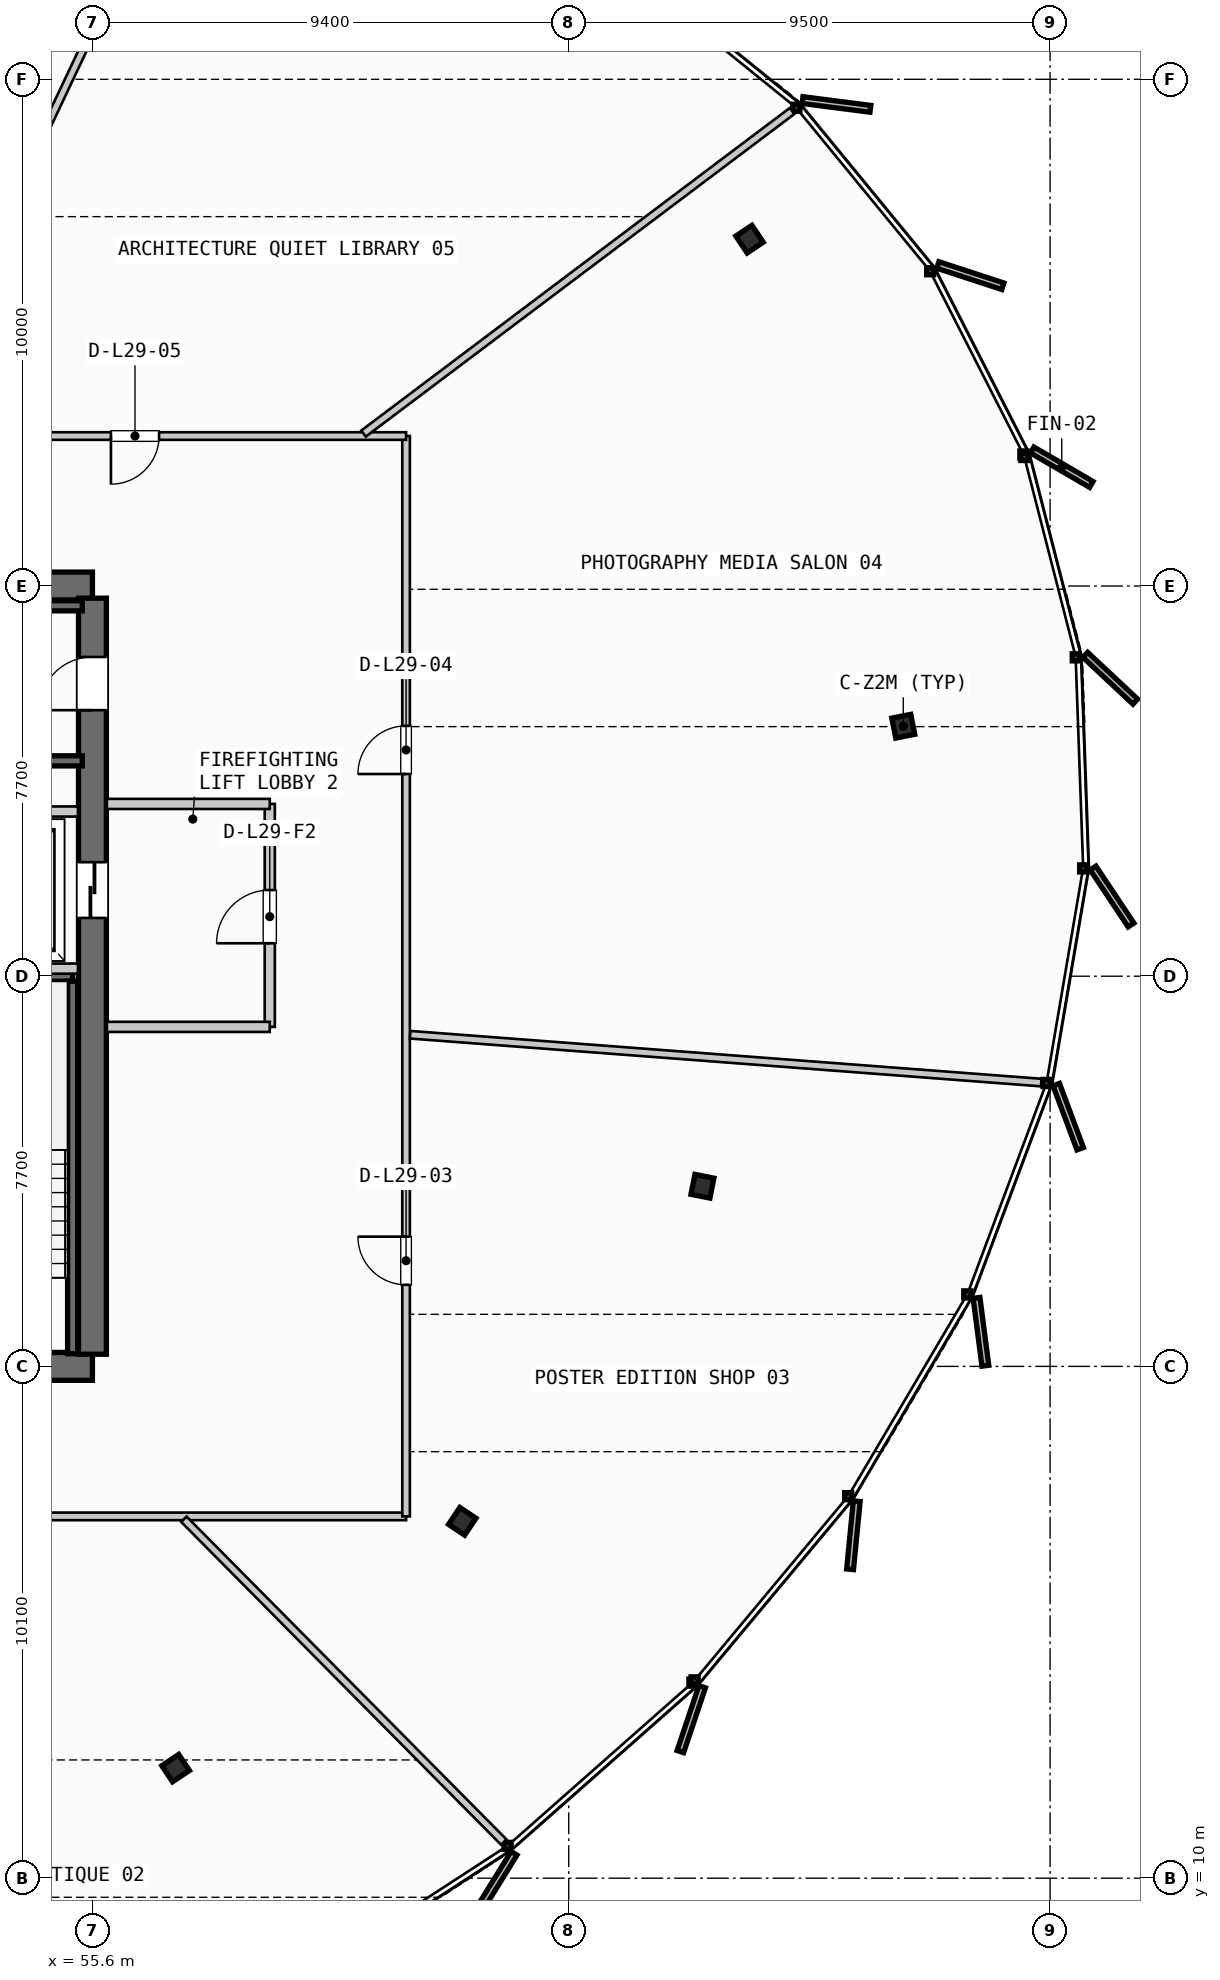
"""IFC4 building model, lengths in metres.
Left out: names, types, materials, properties, quantities, classifications, styles, units other than length and angle.
Written with IfcOpenShell. Run it as: python <this file> out.ifc"""

import sys

from ifc_helpers import new_model, si_unit, direction, frame, frame_2d, origin, origin_2d, place, context, subcontext, project, spatial, rectangle, i_section, extrude, source, transform, mapped, element, fill, save


model = new_model("IFC4")
c1 = context("Model", 3, precision=1e-05, world=origin(), true_north=direction((0.0, 1.0)))
c2 = subcontext(c1, "Body", "Model", "MODEL_VIEW")
j1 = project(units=[si_unit("LENGTHUNIT", "METRE"), si_unit("PLANEANGLEUNIT", "RADIAN")], contexts=[c1])
p1 = place(None, origin())
s1 = spatial("IfcSite", under=j1, at=p1, CompositionType="ELEMENT")
p2 = place(p1, origin())
s2 = spatial("IfcBuilding", under=s1, at=p2, CompositionType="ELEMENT")
p3 = place(p2, frame((0.0, 0.0, 118.0)))
s3 = spatial("IfcBuildingStorey", under=s2, at=p3, CompositionType="ELEMENT", Elevation=118.0)
p4 = place(p3, frame((38.0, 20.1, 0.0), z_axis=(0.0, 0.0, 1.0), x_axis=(1.0, 0.0, 0.0)))
e1 = element("IfcWall", 1, at=p4, inside=s3, PredefinedType="SHEAR", context=c2, shape_type="SweptSolid", body=[
    extrude(rectangle(XDim=17.6, YDim=0.55, at=frame_2d((8.8, 0.0))), origin(), (0.0, 0.0, 1.0), 3.35),
])
p5 = place(p4, frame((1.4, 0.0, 0.0)))
e2 = element("IfcOpeningElement", 2, at=p5, cuts=e1, PredefinedType="OPENING", context=c2, shape_type="SweptSolid", body=[
    extrude(rectangle(XDim=1.05, YDim=2.15, at=frame_2d((0.525, 1.075))), frame((0.0, 0.285, 0.0), z_axis=(0.0, -1.0, 0.0), x_axis=(1.0, 0.0, 0.0)), (0.0, 0.0, 1.0), 0.57),
])
p6 = place(p4, frame((15.15, 0.0, 0.0)))
e3 = element("IfcOpeningElement", 3, at=p6, cuts=e1, PredefinedType="OPENING", context=c2, shape_type="SweptSolid", body=[
    extrude(rectangle(XDim=1.05, YDim=2.15, at=frame_2d((0.525, 1.075))), frame((0.0, 0.285, 0.0), z_axis=(0.0, -1.0, 0.0), x_axis=(1.0, 0.0, 0.0)), (0.0, 0.0, 1.0), 0.57),
])
p7 = place(p3, frame((55.6, 35.5, 0.0), z_axis=(0.0, 0.0, 1.0), x_axis=(-1.0, 0.0, 0.0)))
e4 = element("IfcWall", 4, at=p7, inside=s3, PredefinedType="SHEAR", context=c2, shape_type="SweptSolid", body=[
    extrude(rectangle(XDim=17.6, YDim=0.55, at=frame_2d((8.8, 0.0))), origin(), (0.0, 0.0, 1.0), 3.35),
])
p8 = place(p7, frame((8.05, 0.0, 0.0)))
e5 = element("IfcOpeningElement", 5, at=p8, cuts=e4, PredefinedType="OPENING", context=c2, shape_type="SweptSolid", body=[
    extrude(rectangle(XDim=1.5, YDim=2.2, at=frame_2d((0.75, 1.1))), frame((0.0, 0.285, 0.0), z_axis=(0.0, -1.0, 0.0), x_axis=(1.0, 0.0, 0.0)), (0.0, 0.0, 1.0), 0.57),
])
p9 = place(p7, frame((14.95, 0.0, 0.0)))
e6 = element("IfcOpeningElement", 6, at=p9, cuts=e4, PredefinedType="OPENING", context=c2, shape_type="SweptSolid", body=[
    extrude(rectangle(XDim=1.4, YDim=2.3, at=frame_2d((0.7, 1.15))), frame((0.0, 0.285, 0.0), z_axis=(0.0, -1.0, 0.0), x_axis=(1.0, 0.0, 0.0)), (0.0, 0.0, 1.0), 0.57),
])
p10 = place(p7, frame((12.6, 0.0, 0.0)))
e7 = element("IfcOpeningElement", 7, at=p10, cuts=e4, PredefinedType="OPENING", context=c2, shape_type="SweptSolid", body=[
    extrude(rectangle(XDim=0.95, YDim=2.15, at=frame_2d((0.475, 1.075))), frame((0.0, 0.285, 0.0), z_axis=(0.0, -1.0, 0.0), x_axis=(1.0, 0.0, 0.0)), (0.0, 0.0, 1.0), 0.57),
])
p11 = place(p7, frame((10.45, 0.0, 0.0)))
e8 = element("IfcOpeningElement", 8, at=p11, cuts=e4, PredefinedType="OPENING", context=c2, shape_type="SweptSolid", body=[
    extrude(rectangle(XDim=0.95, YDim=2.15, at=frame_2d((0.475, 1.075))), frame((0.0, 0.285, 0.0), z_axis=(0.0, -1.0, 0.0), x_axis=(1.0, 0.0, 0.0)), (0.0, 0.0, 1.0), 0.57),
])
p12 = place(p3, frame((55.6, 20.34, 0.0), z_axis=(0.0, 0.0, 1.0), x_axis=(0.0, 1.0, 0.0)))
e9 = element("IfcWall", 9, at=p12, inside=s3, PredefinedType="SHEAR", context=c2, shape_type="SweptSolid", body=[
    extrude(rectangle(XDim=14.92, YDim=0.55, at=frame_2d((7.46, 0.0))), origin(), (0.0, 0.0, 1.0), 3.35),
])
p13 = place(p12, frame((12.71, 0.0, 0.0)))
e10 = element("IfcOpeningElement", 10, at=p13, cuts=e9, PredefinedType="OPENING", context=c2, shape_type="SweptSolid", body=[
    extrude(rectangle(XDim=1.05, YDim=2.15, at=frame_2d((0.525, 1.075))), frame((0.0, 0.285, 0.0), z_axis=(0.0, -1.0, 0.0), x_axis=(1.0, 0.0, 0.0)), (0.0, 0.0, 1.0), 0.57),
])
p14 = place(p12, frame((8.61, 0.0, 0.0)))
e11 = element("IfcOpeningElement", 11, at=p14, cuts=e9, PredefinedType="OPENING", context=c2, shape_type="SweptSolid", body=[
    extrude(rectangle(XDim=1.1, YDim=2.2, at=frame_2d((0.55, 1.1))), frame((0.0, 0.285, 0.0), z_axis=(0.0, -1.0, 0.0), x_axis=(1.0, 0.0, 0.0)), (0.0, 0.0, 1.0), 0.57),
])
m1 = source(origin(), c2, "Body", "SweptSolid", [
    extrude(i_section(OverallWidth=0.401, OverallDepth=0.381, WebThickness=0.032, FlangeThickness=0.051, FilletRadius=0.015, at=origin_2d()), origin(), (0.0, 0.0, 1.0), 3.35),
])
for number, where, z_axis, x_axis in (
    (12, (71.603, 32.733, 0.0), (0.0, 0.0, 1.0), (0.981, 0.195, 0.0)),
    (13, (68.569, 42.345, 0.0), (0.0, 0.0, 1.0), (0.831, 0.556, 0.0)),
    (14, (57.242, 12.172, 0.0), (0.0, 0.0, 1.0), (0.556, -0.831, 0.0)),
    (15, (62.899, 17.043, 0.0), (0.0, 0.0, 1.0), (0.831, -0.556, 0.0)),
    (16, (67.639, 23.655, 0.0), (0.0, 0.0, 1.0), (0.981, -0.195, 0.0)),
):
    element("IfcColumn", number, at=place(p3, frame(where, z_axis=z_axis, x_axis=x_axis)), inside=s3, PredefinedType="COLUMN", context=c2, shape_type="MappedRepresentation", body=[
        mapped(m1, transform((0.0, 0.0, 0.0), scale=1.0)),
    ])
p15 = place(p3, frame((52.15, 27.8, 0.0), z_axis=(0.0, 0.0, 1.0), x_axis=(1.0, 0.0, 0.0)))
e17 = element("IfcWall", 17, at=p15, inside=s3, PredefinedType="SHEAR", context=c2, shape_type="SweptSolid", body=[
    extrude(rectangle(XDim=3.06, YDim=0.2, at=frame_2d((1.53, 0.0))), origin(), (0.0, 0.0, 1.0), 3.35),
])
for number, where, z_axis, x_axis in (
    (18, (55.21, 27.7, 0.0), (0.0, 0.0, 1.0), (0.0, -1.0, 0.0)),
    (19, (48.05, 35.11, 0.0), (0.0, 0.0, 1.0), (1.0, 0.0, 0.0)),
    (20, (55.4, 32.05, 0.0), (0.0, 0.0, 1.0), (-1.0, 0.0, 0.0)),
):
    element("IfcWall", number, at=place(p3, frame(where, z_axis=z_axis, x_axis=x_axis)), inside=s3, PredefinedType="SHEAR", context=c2, shape_type="SweptSolid", body=[
        extrude(rectangle(XDim=7.35, YDim=0.2, at=frame_2d((3.675, 0.0))), origin(), (0.0, 0.0, 1.0), 3.35),
    ])
for number, where, z_axis, x_axis in (
    (21, (52.45, 27.95, 0.0), (0.0, 0.0, 1.0), (1.0, 0.0, 0.0)),
    (22, (52.45, 31.05, 0.0), (0.0, 0.0, 1.0), (1.0, 0.0, 0.0)),
):
    element("IfcWall", number, at=place(p3, frame(where, z_axis=z_axis, x_axis=x_axis)), inside=s3, PredefinedType="PARTITIONING", context=c2, shape_type="SweptSolid", body=[
        extrude(rectangle(XDim=2.865, YDim=0.2, at=frame_2d((1.433, 0.0))), origin(), (0.0, 0.0, 1.0), 2.775),
    ])
p16 = place(p3, frame((59.1, 26.8, 0.0), z_axis=(0.0, 0.0, 1.0), x_axis=(0.0, 1.0, 0.0)))
e23 = element("IfcWall", 23, at=p16, inside=s3, PredefinedType="PARTITIONING", context=c2, shape_type="SweptSolid", body=[
    extrude(rectangle(XDim=4.4, YDim=0.2, at=frame_2d((2.2, 0.0))), origin(), (0.0, 0.0, 1.0), 2.775),
])
p17 = place(p16, frame((1.65, 0.0, 0.0)))
e24 = element("IfcOpeningElement", 24, at=p17, cuts=e23, PredefinedType="OPENING", context=c2, shape_type="SweptSolid", body=[
    extrude(rectangle(XDim=1.05, YDim=2.15, at=frame_2d((0.525, 1.075))), frame((0.0, 0.11, 0.0), z_axis=(0.0, -1.0, 0.0), x_axis=(1.0, 0.0, 0.0)), (0.0, 0.0, 1.0), 0.22),
])
for number, where, z_axis, x_axis in (
    (25, (55.885, 26.8, 0.0), (0.0, 0.0, 1.0), (1.0, 0.0, 0.0)),
    (26, (55.885, 31.2, 0.0), (0.0, 0.0, 1.0), (1.0, 0.0, 0.0)),
):
    element("IfcWall", number, at=place(p3, frame(where, z_axis=z_axis, x_axis=x_axis)), inside=s3, PredefinedType="PARTITIONING", context=c2, shape_type="SweptSolid", body=[
        extrude(rectangle(XDim=3.215, YDim=0.2, at=frame_2d((1.607, 0.0))), origin(), (0.0, 0.0, 1.0), 2.775),
    ])
p18 = place(p3, frame((31.81, 17.14, 0.0), z_axis=(0.0, 0.0, 1.0), x_axis=(1.0, 0.0, 0.0)))
e27 = element("IfcWall", 27, at=p18, inside=s3, PredefinedType="PARTITIONING", context=c2, shape_type="SweptSolid", body=[
    extrude(rectangle(XDim=29.98, YDim=0.15, at=frame_2d((14.99, 0.0))), origin(), (0.0, 0.0, 1.0), 2.775),
])
p19 = place(p18, frame((7.129, 0.0, 0.0)))
e28 = element("IfcOpeningElement", 28, at=p19, cuts=e27, PredefinedType="OPENING", context=c2, shape_type="SweptSolid", body=[
    extrude(rectangle(XDim=0.95, YDim=2.15, at=frame_2d((0.475, 1.075))), frame((0.0, 0.085, 0.0), z_axis=(0.0, -1.0, 0.0), x_axis=(1.0, 0.0, 0.0)), (0.0, 0.0, 1.0), 0.17),
])
p20 = place(p18, frame((19.544, 0.0, 0.0)))
e29 = element("IfcOpeningElement", 29, at=p20, cuts=e27, PredefinedType="OPENING", context=c2, shape_type="SweptSolid", body=[
    extrude(rectangle(XDim=0.95, YDim=2.15, at=frame_2d((0.475, 1.075))), frame((0.0, 0.085, 0.0), z_axis=(0.0, -1.0, 0.0), x_axis=(1.0, 0.0, 0.0)), (0.0, 0.0, 1.0), 0.17),
])
p21 = place(p3, frame((61.79, 17.14, 0.0), z_axis=(0.0, 0.0, 1.0), x_axis=(0.0, 1.0, 0.0)))
e30 = element("IfcWall", 30, at=p21, inside=s3, PredefinedType="PARTITIONING", context=c2, shape_type="SweptSolid", body=[
    extrude(rectangle(XDim=21.32, YDim=0.15, at=frame_2d((10.66, 0.0))), origin(), (0.0, 0.0, 1.0), 2.775),
])
p22 = place(p21, frame((4.571, 0.0, 0.0)))
e31 = element("IfcOpeningElement", 31, at=p22, cuts=e30, PredefinedType="OPENING", context=c2, shape_type="SweptSolid", body=[
    extrude(rectangle(XDim=0.95, YDim=2.15, at=frame_2d((0.475, 1.075))), frame((0.0, 0.085, 0.0), z_axis=(0.0, -1.0, 0.0), x_axis=(1.0, 0.0, 0.0)), (0.0, 0.0, 1.0), 0.17),
])
p23 = place(p21, frame((14.65, 0.0, 0.0)))
e32 = element("IfcOpeningElement", 32, at=p23, cuts=e30, PredefinedType="OPENING", context=c2, shape_type="SweptSolid", body=[
    extrude(rectangle(XDim=0.95, YDim=2.15, at=frame_2d((0.475, 1.075))), frame((0.0, 0.085, 0.0), z_axis=(0.0, -1.0, 0.0), x_axis=(1.0, 0.0, 0.0)), (0.0, 0.0, 1.0), 0.17),
])
p24 = place(p3, frame((61.79, 38.46, 0.0), z_axis=(0.0, 0.0, 1.0), x_axis=(-1.0, 0.0, 0.0)))
e33 = element("IfcWall", 33, at=p24, inside=s3, PredefinedType="PARTITIONING", context=c2, shape_type="SweptSolid", body=[
    extrude(rectangle(XDim=29.98, YDim=0.15, at=frame_2d((14.99, 0.0))), origin(), (0.0, 0.0, 1.0), 2.775),
])
p25 = place(p24, frame((4.875, 0.0, 0.0)))
e34 = element("IfcOpeningElement", 34, at=p25, cuts=e33, PredefinedType="OPENING", context=c2, shape_type="SweptSolid", body=[
    extrude(rectangle(XDim=0.95, YDim=2.15, at=frame_2d((0.475, 1.075))), frame((0.0, 0.085, 0.0), z_axis=(0.0, -1.0, 0.0), x_axis=(1.0, 0.0, 0.0)), (0.0, 0.0, 1.0), 0.17),
])
p26 = place(p24, frame((14.019, 0.0, 0.0)))
e35 = element("IfcOpeningElement", 35, at=p26, cuts=e33, PredefinedType="OPENING", context=c2, shape_type="SweptSolid", body=[
    extrude(rectangle(XDim=0.95, YDim=2.15, at=frame_2d((0.475, 1.075))), frame((0.0, 0.085, 0.0), z_axis=(0.0, -1.0, 0.0), x_axis=(1.0, 0.0, 0.0)), (0.0, 0.0, 1.0), 0.17),
])
p27 = place(p24, frame((21.85, 0.0, 0.0)))
e36 = element("IfcOpeningElement", 36, at=p27, cuts=e33, PredefinedType="OPENING", context=c2, shape_type="SweptSolid", body=[
    extrude(rectangle(XDim=0.95, YDim=2.15, at=frame_2d((0.475, 1.075))), frame((0.0, 0.085, 0.0), z_axis=(0.0, -1.0, 0.0), x_axis=(1.0, 0.0, 0.0)), (0.0, 0.0, 1.0), 0.17),
])
p28 = place(p3, frame((57.405, 17.083, 0.0), z_axis=(0.0, 0.0, 1.0), x_axis=(0.703901110521, -0.710297984375, 0.0)))
e37 = element("IfcWall", 37, at=p28, inside=s3, PredefinedType="PARTITIONING", context=c2, shape_type="SweptSolid", body=[
    extrude(rectangle(XDim=8.969, YDim=0.15, at=frame_2d((4.484, 0.0))), origin(), (0.0, 0.0, 1.0), 2.775),
])
p29 = place(p3, frame((61.87, 26.645, 0.0), z_axis=(0.0, 0.0, 1.0), x_axis=(0.997139631177, -0.075581452335, 0.0)))
e38 = element("IfcWall", 38, at=p29, inside=s3, PredefinedType="PARTITIONING", context=c2, shape_type="SweptSolid", body=[
    extrude(rectangle(XDim=12.491, YDim=0.15, at=frame_2d((6.246, 0.0))), origin(), (0.0, 0.0, 1.0), 2.775),
])
p30 = place(p3, frame((60.95, 38.508, 0.0), z_axis=(0.0, 0.0, 1.0), x_axis=(0.798949900746, 0.60139758571, 0.0)))
e39 = element("IfcWall", 39, at=p30, inside=s3, PredefinedType="PARTITIONING", context=c2, shape_type="SweptSolid", body=[
    extrude(rectangle(XDim=10.586, YDim=0.15, at=frame_2d((5.293, 0.0))), origin(), (0.0, 0.0, 1.0), 2.775),
])
p31 = place(p3, frame((51.844, 38.532, 0.0), z_axis=(0.0, 0.0, 1.0), x_axis=(0.427420913061, 0.904052743526, 0.0)))
e40 = element("IfcWall", 40, at=p31, inside=s3, PredefinedType="PARTITIONING", context=c2, shape_type="SweptSolid", body=[
    extrude(rectangle(XDim=13.881, YDim=0.15, at=frame_2d((6.94, 0.0))), origin(), (0.0, 0.0, 1.0), 2.775),
])
m2 = source(origin(), c2, "Body", "SweptSolid", [
    extrude(rectangle(XDim=1.05, YDim=2.15, at=frame_2d((0.525, 1.075))), frame((0.0, 0.025, 0.0), z_axis=(0.0, -1.0, 0.0), x_axis=(1.0, 0.0, 0.0)), (0.0, 0.0, 1.0), 0.05),
])
p32 = place(p13, origin())
e41 = element("IfcDoor", 41, at=p32, inside=s3, OperationType="SINGLE_SWING_LEFT", PredefinedType="DOOR", context=c2, shape_type="MappedRepresentation", body=[
    mapped(m2, transform((0.0, 0.0, 0.0), scale=1.0)),
])
fill(e10, e41)
m3 = source(origin(), c2, "Body", "SweptSolid", [
    extrude(rectangle(XDim=1.1, YDim=2.2, at=frame_2d((0.55, 1.1))), frame((0.0, 0.025, 0.0), z_axis=(0.0, -1.0, 0.0), x_axis=(1.0, 0.0, 0.0)), (0.0, 0.0, 1.0), 0.05),
])
p33 = place(p14, origin())
e42 = element("IfcDoor", 42, at=p33, inside=s3, OperationType="SLIDING_TO_RIGHT", PredefinedType="DOOR", context=c2, shape_type="MappedRepresentation", body=[
    mapped(m3, transform((0.0, 0.0, 0.0), scale=1.0)),
])
fill(e11, e42)
p34 = place(p17, origin())
e43 = element("IfcDoor", 43, at=p34, inside=s3, OperationType="SINGLE_SWING_LEFT", PredefinedType="DOOR", context=c2, shape_type="MappedRepresentation", body=[
    mapped(m2, transform((0.0, 0.0, 0.0), scale=1.0)),
])
fill(e24, e43)
m4 = source(origin(), c2, "Body", "SweptSolid", [
    extrude(rectangle(XDim=0.95, YDim=2.15, at=frame_2d((0.475, 1.075))), frame((0.0, 0.025, 0.0), z_axis=(0.0, -1.0, 0.0), x_axis=(1.0, 0.0, 0.0)), (0.0, 0.0, 1.0), 0.05),
])
p35 = place(p22, origin())
e44 = element("IfcDoor", 44, at=p35, inside=s3, OperationType="SINGLE_SWING_RIGHT", PredefinedType="DOOR", context=c2, shape_type="MappedRepresentation", body=[
    mapped(m4, transform((0.0, 0.0, 0.0), scale=1.0)),
])
fill(e31, e44)
p36 = place(p23, origin())
e45 = element("IfcDoor", 45, at=p36, inside=s3, OperationType="SINGLE_SWING_LEFT", PredefinedType="DOOR", context=c2, shape_type="MappedRepresentation", body=[
    mapped(m4, transform((0.0, 0.0, 0.0), scale=1.0)),
])
fill(e32, e45)
p37 = place(p25, origin())
e46 = element("IfcDoor", 46, at=p37, inside=s3, OperationType="SINGLE_SWING_RIGHT", PredefinedType="DOOR", context=c2, shape_type="MappedRepresentation", body=[
    mapped(m4, transform((0.0, 0.0, 0.0), scale=1.0)),
])
fill(e34, e46)
save(model, sys.argv[1])
